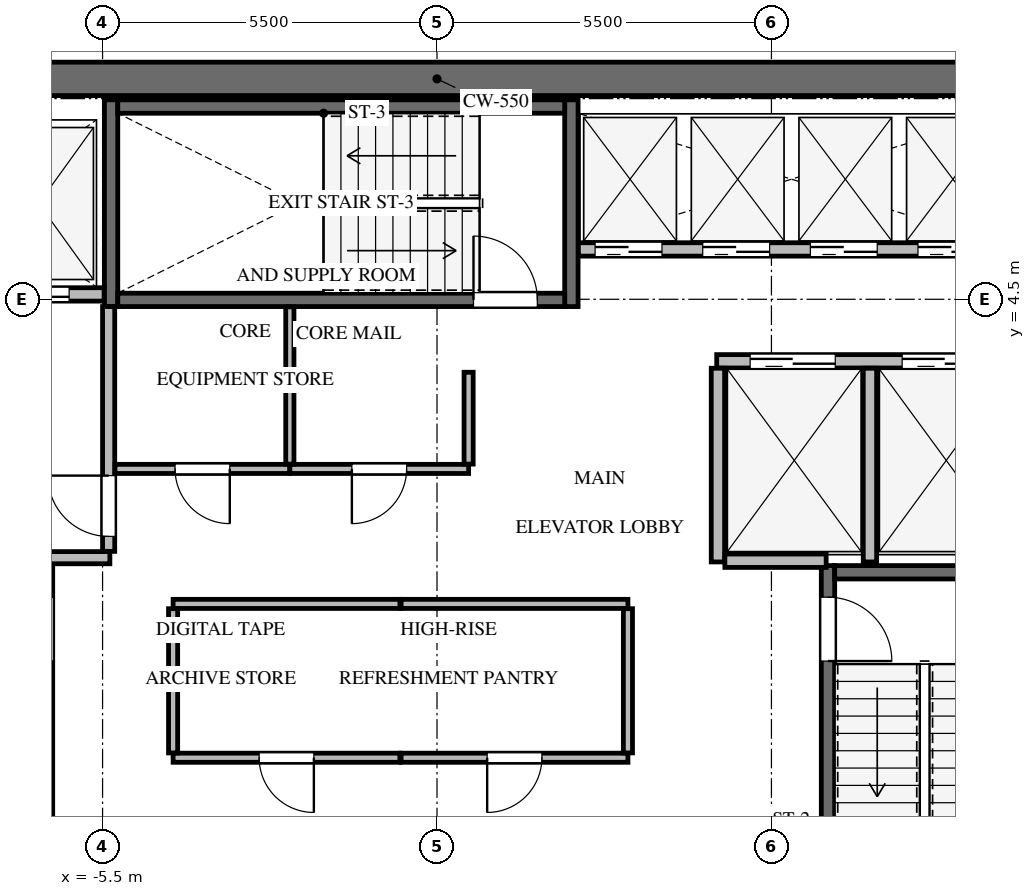
"""IFC4 building model, lengths in metres.
Left out: names, types, materials, properties, quantities, classifications, styles, units other than length and angle.
Written with IfcOpenShell. Run it as: python <this file> out.ifc"""

import sys

from ifc_helpers import new_model, si_unit, direction, frame, frame_2d, origin, place, context, subcontext, project, spatial, rectangle, extrude, source, transform, mapped, element, fill, save


model = new_model("IFC4")
c1 = context("Model", 3, precision=1e-05, world=origin(), true_north=direction((0.0, 1.0)))
c2 = subcontext(c1, "Body", "Model", "MODEL_VIEW")
j1 = project(units=[si_unit("LENGTHUNIT", "METRE"), si_unit("PLANEANGLEUNIT", "RADIAN")], contexts=[c1])
p1 = place(None, origin())
s1 = spatial("IfcSite", under=j1, at=p1, CompositionType="ELEMENT")
p2 = place(p1, origin())
s2 = spatial("IfcBuilding", under=s1, at=p2, CompositionType="ELEMENT")
p3 = place(p2, frame((0.0, 0.0, 254.7)))
s3 = spatial("IfcBuildingStorey", under=s2, at=p3, CompositionType="ELEMENT", Elevation=254.7)
p4 = place(p3, frame((-9.85, 8.125, 0.0), z_axis=(0.0, 0.0, 1.0), x_axis=(1.0, 0.0, 0.0)))
e1 = element("IfcWall", 1, at=p4, inside=s3, PredefinedType="SHEAR", context=c2, shape_type="SweptSolid", body=[
    extrude(rectangle(XDim=19.7, YDim=0.55, at=frame_2d((9.85, 0.0))), origin(), (0.0, 0.0, 1.0), 3.4),
])
p5 = place(p3, frame((-6.43, -7.77, -0.24), z_axis=(0.0, 0.0, 1.0), x_axis=(0.0, 1.0, 0.0)))
e2 = element("IfcWall", 2, at=p5, inside=s3, PredefinedType="SHEAR", context=c2, shape_type="SweptSolid", body=[
    extrude(rectangle(XDim=7.89, YDim=0.22, at=frame_2d((3.945, 0.0))), origin(), (0.0, 0.0, 1.0), 3.4),
])
p6 = place(p5, frame((6.32, 0.0, 0.0)))
e3 = element("IfcOpeningElement", 3, at=p6, cuts=e2, PredefinedType="OPENING", context=c2, shape_type="SweptSolid", body=[
    extrude(rectangle(XDim=1.05, YDim=2.15, at=frame_2d((0.525, 1.075))), frame((0.0, 0.12, 0.0), z_axis=(0.0, -1.0, 0.0), x_axis=(1.0, 0.0, 0.0)), (0.0, 0.0, 1.0), 0.24),
])
p7 = place(p3, frame((6.43, 0.12, -0.24), z_axis=(0.0, 0.0, 1.0), x_axis=(0.0, -1.0, 0.0)))
e4 = element("IfcWall", 4, at=p7, inside=s3, PredefinedType="SHEAR", context=c2, shape_type="SweptSolid", body=[
    extrude(rectangle(XDim=7.89, YDim=0.22, at=frame_2d((3.945, 0.0))), origin(), (0.0, 0.0, 1.0), 3.4),
])
p8 = place(p7, frame((0.52, 0.0, 0.0)))
e5 = element("IfcOpeningElement", 5, at=p8, cuts=e4, PredefinedType="OPENING", context=c2, shape_type="SweptSolid", body=[
    extrude(rectangle(XDim=1.05, YDim=2.15, at=frame_2d((0.525, 1.075))), frame((0.0, 0.12, 0.0), z_axis=(0.0, -1.0, 0.0), x_axis=(1.0, 0.0, 0.0)), (0.0, 0.0, 1.0), 0.24),
])
p9 = place(p3, frame((9.5, 0.01, -0.24), z_axis=(0.0, 0.0, 1.0), x_axis=(-1.0, 0.0, 0.0)))
e6 = element("IfcWall", 6, at=p9, inside=s3, PredefinedType="SHEAR", context=c2, shape_type="SweptSolid", body=[
    extrude(rectangle(XDim=2.96, YDim=0.22, at=frame_2d((1.48, 0.0))), origin(), (0.0, 0.0, 1.0), 3.4),
])
for number, where, z_axis, x_axis in (
    (7, (2.21, 4.38, -0.24), (0.0, 0.0, 1.0), (0.0, 1.0, 0.0)),
    (8, (-5.36, 7.78, -0.24), (0.0, 0.0, 1.0), (0.0, -1.0, 0.0)),
):
    element("IfcWall", number, at=place(p3, frame(where, z_axis=z_axis, x_axis=x_axis)), inside=s3, PredefinedType="SHEAR", context=c2, shape_type="SweptSolid", body=[
        extrude(rectangle(XDim=3.4, YDim=0.22, at=frame_2d((1.7, 0.0))), origin(), (0.0, 0.0, 1.0), 3.4),
    ])
p10 = place(p3, frame((-5.25, 4.49, -0.24), z_axis=(0.0, 0.0, 1.0), x_axis=(1.0, 0.0, 0.0)))
e9 = element("IfcWall", 9, at=p10, inside=s3, PredefinedType="SHEAR", context=c2, shape_type="SweptSolid", body=[
    extrude(rectangle(XDim=7.35, YDim=0.22, at=frame_2d((3.675, 0.0))), origin(), (0.0, 0.0, 1.0), 3.4),
])
p11 = place(p10, frame((5.85, 0.0, 0.0)))
e10 = element("IfcOpeningElement", 10, at=p11, cuts=e9, PredefinedType="OPENING", context=c2, shape_type="SweptSolid", body=[
    extrude(rectangle(XDim=1.05, YDim=2.15, at=frame_2d((0.525, 1.075))), frame((0.0, 0.12, 0.0), z_axis=(0.0, -1.0, 0.0), x_axis=(1.0, 0.0, 0.0)), (0.0, 0.0, 1.0), 0.24),
])
p12 = place(p3, frame((2.1, 7.67, -0.24), z_axis=(0.0, 0.0, 1.0), x_axis=(-1.0, 0.0, 0.0)))
e11 = element("IfcWall", 11, at=p12, inside=s3, PredefinedType="SHEAR", context=c2, shape_type="SweptSolid", body=[
    extrude(rectangle(XDim=7.35, YDim=0.22, at=frame_2d((3.675, 0.0))), origin(), (0.0, 0.0, 1.0), 3.4),
])
p13 = place(p3, frame((-9.65, 4.58, 0.0), z_axis=(0.0, 0.0, 1.0), x_axis=(1.0, 0.0, 0.0)))
e12 = element("IfcWall", 12, at=p13, inside=s3, PredefinedType="SOLIDWALL", context=c2, shape_type="SweptSolid", body=[
    extrude(rectangle(XDim=4.175, YDim=0.22, at=frame_2d((2.087, 0.0))), origin(), (0.0, 0.0, 1.0), 3.145),
])
p14 = place(p13, frame((0.4, 0.0, 0.0)))
e13 = element("IfcOpeningElement", 13, at=p14, cuts=e12, PredefinedType="OPENING", context=c2, shape_type="SweptSolid", body=[
    extrude(rectangle(XDim=1.2, YDim=2.15, at=frame_2d((0.6, 1.075))), frame((0.0, 0.12, 0.0), z_axis=(0.0, -1.0, 0.0), x_axis=(1.0, 0.0, 0.0)), (0.0, 0.0, 1.0), 0.24),
])
p15 = place(p13, frame((2.4, 0.0, 0.0)))
e14 = element("IfcOpeningElement", 14, at=p15, cuts=e12, PredefinedType="OPENING", context=c2, shape_type="SweptSolid", body=[
    extrude(rectangle(XDim=1.2, YDim=2.15, at=frame_2d((0.6, 1.075))), frame((0.0, 0.12, 0.0), z_axis=(0.0, -1.0, 0.0), x_axis=(1.0, 0.0, 0.0)), (0.0, 0.0, 1.0), 0.24),
])
p16 = place(p3, frame((-9.65, 0.25, 0.0), z_axis=(0.0, 0.0, 1.0), x_axis=(1.0, 0.0, 0.0)))
e15 = element("IfcWall", 15, at=p16, inside=s3, PredefinedType="SOLIDWALL", context=c2, shape_type="SweptSolid", body=[
    extrude(rectangle(XDim=4.27, YDim=0.2, at=frame_2d((2.135, 0.0))), origin(), (0.0, 0.0, 1.0), 3.145),
])
p17 = place(p3, frame((-5.4, 0.354, 0.0), z_axis=(0.0, 0.0, 1.0), x_axis=(0.0, 1.0, 0.0)))
e16 = element("IfcWall", 16, at=p17, inside=s3, PredefinedType="SOLIDWALL", context=c2, shape_type="SweptSolid", body=[
    extrude(rectangle(XDim=4.026, YDim=0.2, at=frame_2d((2.013, 0.0))), origin(), (0.0, 0.0, 1.0), 3.145),
])
p18 = place(p17, frame((0.246, 0.0, 0.0)))
e17 = element("IfcOpeningElement", 17, at=p18, cuts=e16, PredefinedType="OPENING", context=c2, shape_type="SweptSolid", body=[
    extrude(rectangle(XDim=1.0, YDim=2.15, at=frame_2d((0.5, 1.075))), frame((0.0, 0.11, 0.0), z_axis=(0.0, -1.0, 0.0), x_axis=(1.0, 0.0, 0.0)), (0.0, 0.0, 1.0), 0.22),
])
p19 = place(p3, frame((4.6, 3.48, 0.0), z_axis=(0.0, 0.0, 1.0), x_axis=(1.0, 0.0, 0.0)))
e18 = element("IfcWall", 18, at=p19, inside=s3, PredefinedType="SOLIDWALL", context=c2, shape_type="SweptSolid", body=[
    extrude(rectangle(XDim=5.05, YDim=0.22, at=frame_2d((2.525, 0.0))), origin(), (0.0, 0.0, 1.0), 3.145),
])
p20 = place(p19, frame((0.55, 0.0, 0.0)))
e19 = element("IfcOpeningElement", 19, at=p20, cuts=e18, PredefinedType="OPENING", context=c2, shape_type="SweptSolid", body=[
    extrude(rectangle(XDim=1.4, YDim=2.15, at=frame_2d((0.7, 1.075))), frame((0.0, 0.12, 0.0), z_axis=(0.0, -1.0, 0.0), x_axis=(1.0, 0.0, 0.0)), (0.0, 0.0, 1.0), 0.24),
])
p21 = place(p19, frame((3.05, 0.0, 0.0)))
e20 = element("IfcOpeningElement", 20, at=p21, cuts=e18, PredefinedType="OPENING", context=c2, shape_type="SweptSolid", body=[
    extrude(rectangle(XDim=1.4, YDim=2.15, at=frame_2d((0.7, 1.075))), frame((0.0, 0.12, 0.0), z_axis=(0.0, -1.0, 0.0), x_axis=(1.0, 0.0, 0.0)), (0.0, 0.0, 1.0), 0.24),
])
for number, where, z_axis, x_axis in (
    (21, (4.62, 0.18, 0.0), (0.0, 0.0, 1.0), (0.0, 1.0, 0.0)),
    (22, (7.12, 0.18, 0.0), (0.0, 0.0, 1.0), (0.0, 1.0, 0.0)),
):
    element("IfcWall", number, at=place(p3, frame(where, z_axis=z_axis, x_axis=x_axis)), inside=s3, PredefinedType="SOLIDWALL", context=c2, shape_type="SweptSolid", body=[
        extrude(rectangle(XDim=3.186, YDim=0.22, at=frame_2d((1.593, 0.0))), origin(), (0.0, 0.0, 1.0), 3.145),
    ])
p22 = place(p3, frame((4.734, 0.2, 0.0), z_axis=(0.0, 0.0, 1.0), x_axis=(1.0, 0.0, 0.0)))
e23 = element("IfcWall", 23, at=p22, inside=s3, PredefinedType="SOLIDWALL", context=c2, shape_type="SweptSolid", body=[
    extrude(rectangle(XDim=1.666, YDim=0.22, at=frame_2d((0.833, 0.0))), origin(), (0.0, 0.0, 1.0), 3.145),
])
p23 = place(p3, frame((2.325, 5.32, 0.0), z_axis=(0.0, 0.0, 1.0), x_axis=(1.0, 0.0, 0.0)))
e24 = element("IfcWall", 24, at=p23, inside=s3, PredefinedType="SOLIDWALL", context=c2, shape_type="SweptSolid", body=[
    extrude(rectangle(XDim=7.325, YDim=0.22, at=frame_2d((3.663, 0.0))), origin(), (0.0, 0.0, 1.0), 3.145),
])
p24 = place(p23, frame((0.275, 0.0, 0.0)))
e25 = element("IfcOpeningElement", 25, at=p24, cuts=e24, PredefinedType="OPENING", context=c2, shape_type="SweptSolid", body=[
    extrude(rectangle(XDim=1.1, YDim=2.15, at=frame_2d((0.55, 1.075))), frame((0.0, 0.12, 0.0), z_axis=(0.0, -1.0, 0.0), x_axis=(1.0, 0.0, 0.0)), (0.0, 0.0, 1.0), 0.24),
])
p25 = place(p23, frame((2.045, 0.0, 0.0)))
e26 = element("IfcOpeningElement", 26, at=p25, cuts=e24, PredefinedType="OPENING", context=c2, shape_type="SweptSolid", body=[
    extrude(rectangle(XDim=1.1, YDim=2.15, at=frame_2d((0.55, 1.075))), frame((0.0, 0.12, 0.0), z_axis=(0.0, -1.0, 0.0), x_axis=(1.0, 0.0, 0.0)), (0.0, 0.0, 1.0), 0.24),
])
p26 = place(p23, frame((3.815, 0.0, 0.0)))
e27 = element("IfcOpeningElement", 27, at=p26, cuts=e24, PredefinedType="OPENING", context=c2, shape_type="SweptSolid", body=[
    extrude(rectangle(XDim=1.1, YDim=2.15, at=frame_2d((0.55, 1.075))), frame((0.0, 0.12, 0.0), z_axis=(0.0, -1.0, 0.0), x_axis=(1.0, 0.0, 0.0)), (0.0, 0.0, 1.0), 0.24),
])
p27 = place(p23, frame((5.585, 0.0, 0.0)))
e28 = element("IfcOpeningElement", 28, at=p27, cuts=e24, PredefinedType="OPENING", context=c2, shape_type="SweptSolid", body=[
    extrude(rectangle(XDim=1.1, YDim=2.15, at=frame_2d((0.55, 1.075))), frame((0.0, 0.12, 0.0), z_axis=(0.0, -1.0, 0.0), x_axis=(1.0, 0.0, 0.0)), (0.0, 0.0, 1.0), 0.24),
])
p28 = place(p3, frame((-0.61, -3.04, 0.0), z_axis=(0.0, 0.0, 1.0), x_axis=(-1.0, 0.0, 0.0)))
e29 = element("IfcWall", 29, at=p28, inside=s3, PredefinedType="PARTITIONING", context=c2, shape_type="SweptSolid", body=[
    extrude(rectangle(XDim=3.73, YDim=0.15, at=frame_2d((1.865, 0.0))), origin(), (0.0, 0.0, 1.0), 3.145),
])
p29 = place(p28, frame((1.415, 0.0, 0.0)))
e30 = element("IfcOpeningElement", 30, at=p29, cuts=e29, PredefinedType="OPENING", context=c2, shape_type="SweptSolid", body=[
    extrude(rectangle(XDim=0.9, YDim=2.05, at=frame_2d((0.45, 1.025))), frame((0.0, 0.085, 0.0), z_axis=(0.0, -1.0, 0.0), x_axis=(1.0, 0.0, 0.0)), (0.0, 0.0, 1.0), 0.17),
])
p30 = place(p3, frame((-4.34, -0.51, 0.0), z_axis=(0.0, 0.0, 1.0), x_axis=(1.0, 0.0, 0.0)))
e31 = element("IfcWall", 31, at=p30, inside=s3, PredefinedType="PARTITIONING", context=c2, shape_type="SweptSolid", body=[
    extrude(rectangle(XDim=3.73, YDim=0.15, at=frame_2d((1.865, 0.0))), origin(), (0.0, 0.0, 1.0), 3.145),
])
p31 = place(p3, frame((-4.34, -2.961, 0.0), z_axis=(0.0, 0.0, 1.0), x_axis=(0.0, 1.0, 0.0)))
e32 = element("IfcWall", 32, at=p31, inside=s3, PredefinedType="PARTITIONING", context=c2, shape_type="SweptSolid", body=[
    extrude(rectangle(XDim=2.372, YDim=0.15, at=frame_2d((1.186, 0.0))), origin(), (0.0, 0.0, 1.0), 3.145),
])
p32 = place(p3, frame((3.14, -3.04, 0.0), z_axis=(0.0, 0.0, 1.0), x_axis=(-1.0, 0.0, 0.0)))
e33 = element("IfcWall", 33, at=p32, inside=s3, PredefinedType="PARTITIONING", context=c2, shape_type="SweptSolid", body=[
    extrude(rectangle(XDim=3.73, YDim=0.15, at=frame_2d((1.865, 0.0))), origin(), (0.0, 0.0, 1.0), 3.145),
])
p33 = place(p32, frame((1.415, 0.0, 0.0)))
e34 = element("IfcOpeningElement", 34, at=p33, cuts=e33, PredefinedType="OPENING", context=c2, shape_type="SweptSolid", body=[
    extrude(rectangle(XDim=0.9, YDim=2.05, at=frame_2d((0.45, 1.025))), frame((0.0, 0.085, 0.0), z_axis=(0.0, -1.0, 0.0), x_axis=(1.0, 0.0, 0.0)), (0.0, 0.0, 1.0), 0.17),
])
p34 = place(p3, frame((-0.59, -0.51, 0.0), z_axis=(0.0, 0.0, 1.0), x_axis=(1.0, 0.0, 0.0)))
e35 = element("IfcWall", 35, at=p34, inside=s3, PredefinedType="PARTITIONING", context=c2, shape_type="SweptSolid", body=[
    extrude(rectangle(XDim=3.73, YDim=0.15, at=frame_2d((1.865, 0.0))), origin(), (0.0, 0.0, 1.0), 3.145),
])
p35 = place(p3, frame((3.14, -0.589, 0.0), z_axis=(0.0, 0.0, 1.0), x_axis=(0.0, -1.0, 0.0)))
e36 = element("IfcWall", 36, at=p35, inside=s3, PredefinedType="PARTITIONING", context=c2, shape_type="SweptSolid", body=[
    extrude(rectangle(XDim=2.372, YDim=0.15, at=frame_2d((1.186, 0.0))), origin(), (0.0, 0.0, 1.0), 3.145),
])
p36 = place(p3, frame((-2.42, 1.71, 0.0), z_axis=(0.0, 0.0, 1.0), x_axis=(-1.0, 0.0, 0.0)))
e37 = element("IfcWall", 37, at=p36, inside=s3, PredefinedType="PARTITIONING", context=c2, shape_type="SweptSolid", body=[
    extrude(rectangle(XDim=2.876, YDim=0.15, at=frame_2d((1.438, 0.0))), origin(), (0.0, 0.0, 1.0), 3.145),
])
p37 = place(p36, frame((0.988, 0.0, 0.0)))
e38 = element("IfcOpeningElement", 38, at=p37, cuts=e37, PredefinedType="OPENING", context=c2, shape_type="SweptSolid", body=[
    extrude(rectangle(XDim=0.9, YDim=2.05, at=frame_2d((0.45, 1.025))), frame((0.0, 0.085, 0.0), z_axis=(0.0, -1.0, 0.0), x_axis=(1.0, 0.0, 0.0)), (0.0, 0.0, 1.0), 0.17),
])
p38 = place(p3, frame((0.52, 1.71, 0.0), z_axis=(0.0, 0.0, 1.0), x_axis=(-1.0, 0.0, 0.0)))
e39 = element("IfcWall", 39, at=p38, inside=s3, PredefinedType="PARTITIONING", context=c2, shape_type="SweptSolid", body=[
    extrude(rectangle(XDim=2.94, YDim=0.15, at=frame_2d((1.47, 0.0))), origin(), (0.0, 0.0, 1.0), 3.145),
])
p39 = place(p38, frame((1.02, 0.0, 0.0)))
e40 = element("IfcOpeningElement", 40, at=p39, cuts=e39, PredefinedType="OPENING", context=c2, shape_type="SweptSolid", body=[
    extrude(rectangle(XDim=0.9, YDim=2.05, at=frame_2d((0.45, 1.025))), frame((0.0, 0.085, 0.0), z_axis=(0.0, -1.0, 0.0), x_axis=(1.0, 0.0, 0.0)), (0.0, 0.0, 1.0), 0.17),
])
p40 = place(p3, frame((0.52, 3.3, 0.0), z_axis=(0.0, 0.0, 1.0), x_axis=(0.0, -1.0, 0.0)))
e41 = element("IfcWall", 41, at=p40, inside=s3, PredefinedType="PARTITIONING", context=c2, shape_type="SweptSolid", body=[
    extrude(rectangle(XDim=1.511, YDim=0.15, at=frame_2d((0.755, 0.0))), origin(), (0.0, 0.0, 1.0), 3.145),
])
p41 = place(p3, frame((-2.42, 4.375, 0.0), z_axis=(0.0, 0.0, 1.0), x_axis=(0.0, -1.0, 0.0)))
e42 = element("IfcWall", 42, at=p41, inside=s3, PredefinedType="PARTITIONING", context=c2, shape_type="SweptSolid", body=[
    extrude(rectangle(XDim=2.586, YDim=0.135, at=frame_2d((1.293, 0.0))), origin(), (0.0, 0.0, 1.0), 3.145),
])
m1 = source(origin(), c2, "Body", "SweptSolid", [
    extrude(rectangle(XDim=1.05, YDim=2.15, at=frame_2d((0.525, 1.075))), frame((0.0, 0.025, 0.0), z_axis=(0.0, -1.0, 0.0), x_axis=(1.0, 0.0, 0.0)), (0.0, 0.0, 1.0), 0.05),
])
p42 = place(p8, origin())
e43 = element("IfcDoor", 43, at=p42, inside=s3, OperationType="SINGLE_SWING_RIGHT", PredefinedType="DOOR", context=c2, shape_type="MappedRepresentation", body=[
    mapped(m1, transform((0.0, 0.0, 0.0), x_axis=(1.0, 0.0, 0.0), y_axis=(0.0, 1.0, 0.0), z_axis=(0.0, 0.0, 1.0), scale=1.0)),
])
fill(e5, e43)
m2 = source(origin(), c2, "Body", "SweptSolid", [
    extrude(rectangle(XDim=1.05, YDim=2.15, at=frame_2d((0.525, 1.075))), frame((0.0, 0.025, 0.0), z_axis=(0.0, -1.0, 0.0), x_axis=(1.0, 0.0, 0.0)), (0.0, 0.0, 1.0), 0.05),
])
p43 = place(p11, origin())
e44 = element("IfcDoor", 44, at=p43, inside=s3, OperationType="SINGLE_SWING_LEFT", PredefinedType="DOOR", context=c2, shape_type="MappedRepresentation", body=[
    mapped(m2, transform((0.0, 0.0, 0.0), x_axis=(1.0, 0.0, 0.0), y_axis=(0.0, 1.0, 0.0), z_axis=(0.0, 0.0, 1.0), scale=1.0)),
])
fill(e10, e44)
m3 = source(origin(), c2, "Body", "SweptSolid", [
    extrude(rectangle(XDim=1.2, YDim=2.15, at=frame_2d((0.6, 1.075))), frame((0.0, 0.025, 0.0), z_axis=(0.0, -1.0, 0.0), x_axis=(1.0, 0.0, 0.0)), (0.0, 0.0, 1.0), 0.05),
])
p44 = place(p15, origin())
e45 = element("IfcDoor", 45, at=p44, inside=s3, OperationType="DOUBLE_DOOR_SLIDING", PredefinedType="DOOR", context=c2, shape_type="MappedRepresentation", body=[
    mapped(m3, transform((0.0, 0.0, 0.0), x_axis=(1.0, 0.0, 0.0), y_axis=(0.0, 1.0, 0.0), z_axis=(0.0, 0.0, 1.0), scale=1.0)),
])
fill(e14, e45)
m4 = source(origin(), c2, "Body", "SweptSolid", [
    extrude(rectangle(XDim=1.0, YDim=2.15, at=frame_2d((0.5, 1.075))), frame((0.0, 0.025, 0.0), z_axis=(0.0, -1.0, 0.0), x_axis=(1.0, 0.0, 0.0)), (0.0, 0.0, 1.0), 0.05),
])
p45 = place(p18, origin())
e46 = element("IfcDoor", 46, at=p45, inside=s3, OperationType="SINGLE_SWING_RIGHT", PredefinedType="DOOR", context=c2, shape_type="MappedRepresentation", body=[
    mapped(m4, transform((0.0, 0.0, 0.0), x_axis=(1.0, 0.0, 0.0), y_axis=(0.0, 1.0, 0.0), z_axis=(0.0, 0.0, 1.0), scale=1.0)),
])
fill(e17, e46)
m5 = source(origin(), c2, "Body", "SweptSolid", [
    extrude(rectangle(XDim=1.4, YDim=2.15, at=frame_2d((0.7, 1.075))), frame((0.0, 0.025, 0.0), z_axis=(0.0, -1.0, 0.0), x_axis=(1.0, 0.0, 0.0)), (0.0, 0.0, 1.0), 0.05),
])
p46 = place(p20, origin())
e47 = element("IfcDoor", 47, at=p46, inside=s3, OperationType="DOUBLE_DOOR_SLIDING", PredefinedType="DOOR", context=c2, shape_type="MappedRepresentation", body=[
    mapped(m5, transform((0.0, 0.0, 0.0), x_axis=(1.0, 0.0, 0.0), y_axis=(0.0, 1.0, 0.0), z_axis=(0.0, 0.0, 1.0), scale=1.0)),
])
fill(e19, e47)
p47 = place(p21, origin())
e48 = element("IfcDoor", 48, at=p47, inside=s3, OperationType="DOUBLE_DOOR_SLIDING", PredefinedType="DOOR", context=c2, shape_type="MappedRepresentation", body=[
    mapped(m5, transform((0.0, 0.0, 0.0), x_axis=(1.0, 0.0, 0.0), y_axis=(0.0, 1.0, 0.0), z_axis=(0.0, 0.0, 1.0), scale=1.0)),
])
fill(e20, e48)
m6 = source(origin(), c2, "Body", "SweptSolid", [
    extrude(rectangle(XDim=1.1, YDim=2.15, at=frame_2d((0.55, 1.075))), frame((0.0, 0.025, 0.0), z_axis=(0.0, -1.0, 0.0), x_axis=(1.0, 0.0, 0.0)), (0.0, 0.0, 1.0), 0.05),
])
p48 = place(p24, origin())
e49 = element("IfcDoor", 49, at=p48, inside=s3, OperationType="DOUBLE_DOOR_SLIDING", PredefinedType="DOOR", context=c2, shape_type="MappedRepresentation", body=[
    mapped(m6, transform((0.0, 0.0, 0.0), x_axis=(1.0, 0.0, 0.0), y_axis=(0.0, 1.0, 0.0), z_axis=(0.0, 0.0, 1.0), scale=1.0)),
])
fill(e25, e49)
p49 = place(p25, origin())
e50 = element("IfcDoor", 50, at=p49, inside=s3, OperationType="DOUBLE_DOOR_SLIDING", PredefinedType="DOOR", context=c2, shape_type="MappedRepresentation", body=[
    mapped(m6, transform((0.0, 0.0, 0.0), x_axis=(1.0, 0.0, 0.0), y_axis=(0.0, 1.0, 0.0), z_axis=(0.0, 0.0, 1.0), scale=1.0)),
])
fill(e26, e50)
p50 = place(p26, origin())
e51 = element("IfcDoor", 51, at=p50, inside=s3, OperationType="DOUBLE_DOOR_SLIDING", PredefinedType="DOOR", context=c2, shape_type="MappedRepresentation", body=[
    mapped(m6, transform((0.0, 0.0, 0.0), x_axis=(1.0, 0.0, 0.0), y_axis=(0.0, 1.0, 0.0), z_axis=(0.0, 0.0, 1.0), scale=1.0)),
])
fill(e27, e51)
p51 = place(p27, origin())
e52 = element("IfcDoor", 52, at=p51, inside=s3, OperationType="DOUBLE_DOOR_SLIDING", PredefinedType="DOOR", context=c2, shape_type="MappedRepresentation", body=[
    mapped(m6, transform((0.0, 0.0, 0.0), x_axis=(1.0, 0.0, 0.0), y_axis=(0.0, 1.0, 0.0), z_axis=(0.0, 0.0, 1.0), scale=1.0)),
])
fill(e28, e52)
m7 = source(origin(), c2, "Body", "SweptSolid", [
    extrude(rectangle(XDim=0.9, YDim=2.05, at=frame_2d((0.45, 1.025))), frame((0.0, 0.025, 0.0), z_axis=(0.0, -1.0, 0.0), x_axis=(1.0, 0.0, 0.0)), (0.0, 0.0, 1.0), 0.05),
])
p52 = place(p29, origin())
e53 = element("IfcDoor", 53, at=p52, inside=s3, OperationType="SINGLE_SWING_LEFT", PredefinedType="DOOR", context=c2, shape_type="MappedRepresentation", body=[
    mapped(m7, transform((0.0, 0.0, 0.0), x_axis=(1.0, 0.0, 0.0), y_axis=(0.0, 1.0, 0.0), z_axis=(0.0, 0.0, 1.0), scale=1.0)),
])
fill(e30, e53)
m8 = source(origin(), c2, "Body", "SweptSolid", [
    extrude(rectangle(XDim=0.9, YDim=2.05, at=frame_2d((0.45, 1.025))), frame((0.0, 0.025, 0.0), z_axis=(0.0, -1.0, 0.0), x_axis=(1.0, 0.0, 0.0)), (0.0, 0.0, 1.0), 0.05),
])
p53 = place(p33, origin())
e54 = element("IfcDoor", 54, at=p53, inside=s3, OperationType="SINGLE_SWING_RIGHT", PredefinedType="DOOR", context=c2, shape_type="MappedRepresentation", body=[
    mapped(m8, transform((0.0, 0.0, 0.0), x_axis=(1.0, 0.0, 0.0), y_axis=(0.0, 1.0, 0.0), z_axis=(0.0, 0.0, 1.0), scale=1.0)),
])
fill(e34, e54)
p54 = place(p37, origin())
e55 = element("IfcDoor", 55, at=p54, inside=s3, OperationType="SINGLE_SWING_LEFT", PredefinedType="DOOR", context=c2, shape_type="MappedRepresentation", body=[
    mapped(m7, transform((0.0, 0.0, 0.0), x_axis=(1.0, 0.0, 0.0), y_axis=(0.0, 1.0, 0.0), z_axis=(0.0, 0.0, 1.0), scale=1.0)),
])
fill(e38, e55)
p55 = place(p39, origin())
e56 = element("IfcDoor", 56, at=p55, inside=s3, OperationType="SINGLE_SWING_RIGHT", PredefinedType="DOOR", context=c2, shape_type="MappedRepresentation", body=[
    mapped(m8, transform((0.0, 0.0, 0.0), x_axis=(1.0, 0.0, 0.0), y_axis=(0.0, 1.0, 0.0), z_axis=(0.0, 0.0, 1.0), scale=1.0)),
])
fill(e40, e56)
save(model, sys.argv[1])
